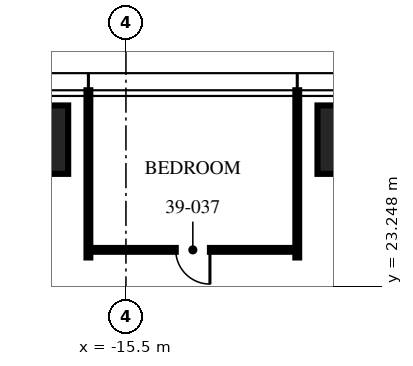
"""IFC4 building model, lengths in metres.
Left out: names, types, materials, properties, quantities, classifications, styles, units other than length and angle.
Written with IfcOpenShell. Run it as: python <this file> out.ifc"""

import sys

from ifc_helpers import new_model, si_unit, direction, frame, frame_2d, origin, origin_2d, place, context, subcontext, project, spatial, rectangle, extrude, element, fill, save


model = new_model("IFC4")
c1 = context("Model", 3, precision=1e-05, world=origin(), true_north=direction((0.0, 1.0)))
c2 = subcontext(c1, "Body", "Model", "MODEL_VIEW")
j1 = project(units=[si_unit("LENGTHUNIT", "METRE"), si_unit("PLANEANGLEUNIT", "RADIAN")], contexts=[c1])
p1 = place(None, origin())
s1 = spatial("IfcSite", under=j1, at=p1, CompositionType="ELEMENT")
p2 = place(p1, origin())
s2 = spatial("IfcBuilding", under=s1, at=p2, CompositionType="ELEMENT")
p3 = place(p2, frame((0.0, 0.0, 156.0)))
s3 = spatial("IfcBuildingStorey", under=s2, at=p3, CompositionType="ELEMENT", Elevation=156.0)
for number, where, z_axis, x_axis in (
    (1, (-18.32, 27.1, 0.0), (0.0, 0.0, 1.0), (1.0, 0.0, 0.0)),
    (2, (-9.16, 27.1, 0.0), (0.0, 0.0, 1.0), (1.0, 0.0, 0.0)),
):
    element("IfcColumn", number, at=place(p3, frame(where, z_axis=z_axis, x_axis=x_axis)), inside=s3, PredefinedType="COLUMN", context=c2, shape_type="SweptSolid", body=[
        extrude(rectangle(XDim=2.6, YDim=1.8, at=origin_2d()), origin(), (0.0, 0.0, 1.0), 3.75),
    ])
for number, where, z_axis, x_axis in (
    (3, (-10.992, 24.0, 0.0), (0.0, 0.0, 1.0), (0.0, 1.0, 0.0)),
    (4, (-16.488, 24.0, 0.0), (0.0, 0.0, 1.0), (0.0, 1.0, 0.0)),
):
    element("IfcWall", number, at=place(p3, frame(where, z_axis=z_axis, x_axis=x_axis)), inside=s3, PredefinedType="PARTITIONING", context=c2, shape_type="SweptSolid", body=[
        extrude(rectangle(XDim=4.4, YDim=0.1, at=frame_2d((2.2, 0.0))), origin(), (0.0, 0.0, 1.0), 2.81),
    ])
p4 = place(p3, frame((-10.992, 24.2, 0.0), z_axis=(0.0, 0.0, 1.0), x_axis=(-1.0, 0.0, 0.0)))
e5 = element("IfcWall", 5, at=p4, inside=s3, PredefinedType="PARTITIONING", context=c2, shape_type="SweptSolid", body=[
    extrude(rectangle(XDim=5.496, YDim=0.1, at=frame_2d((2.748, 0.0))), origin(), (0.0, 0.0, 1.0), 2.81),
])
p5 = place(p4, frame((2.298, 0.0, 0.0)))
e6 = element("IfcOpeningElement", 6, at=p5, cuts=e5, PredefinedType="OPENING", context=c2, shape_type="SweptSolid", body=[
    extrude(rectangle(XDim=0.9, YDim=2.1, at=frame_2d((0.45, 1.05))), frame((0.0, 0.06, 0.0), z_axis=(0.0, -1.0, 0.0), x_axis=(1.0, 0.0, 0.0)), (0.0, 0.0, 1.0), 0.12),
])
p6 = place(p5, origin())
e7 = element("IfcDoor", 7, at=p6, inside=s3, OperationType="SINGLE_SWING_LEFT", PredefinedType="DOOR", context=c2, shape_type="SweptSolid", body=[
    extrude(rectangle(XDim=0.9, YDim=2.1, at=frame_2d((0.45, 1.05))), frame((0.0, 0.025, 0.0), z_axis=(0.0, -1.0, 0.0), x_axis=(1.0, 0.0, 0.0)), (0.0, 0.0, 1.0), 0.05),
])
fill(e6, e7)
save(model, sys.argv[1])
